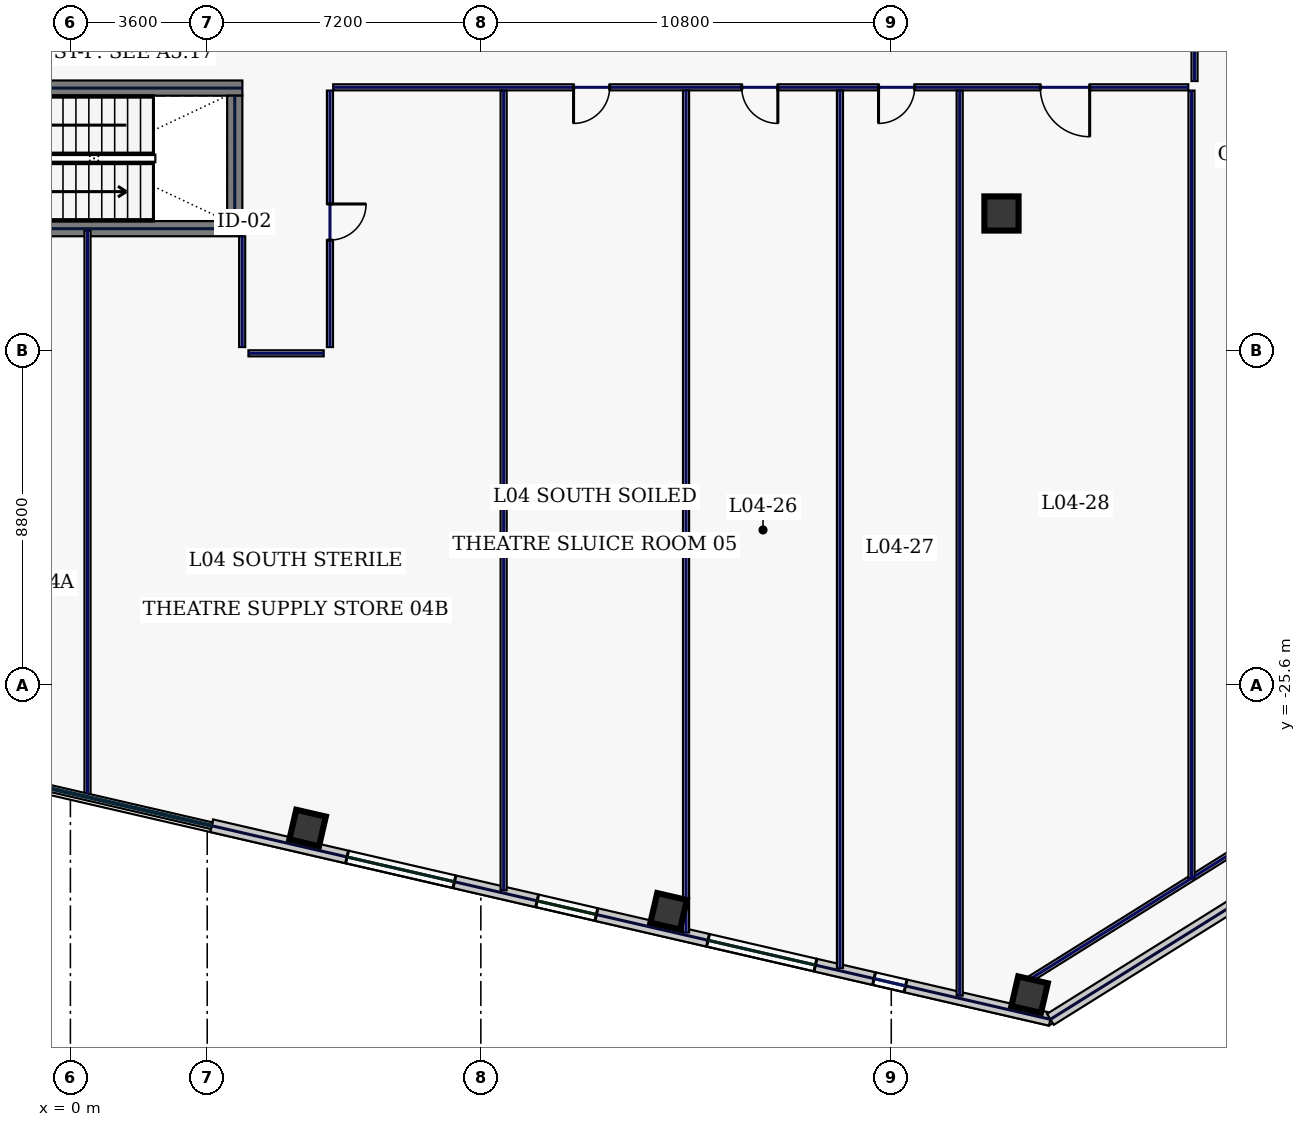
"""IFC4 building model, lengths in metres.
Left out: names, types, materials, properties, quantities, classifications, styles, units other than length and angle.
Written with IfcOpenShell. Run it as: python <this file> out.ifc"""

import sys

from ifc_helpers import new_model, si_unit, direction, frame, frame_2d, origin, origin_2d, place, context, subcontext, project, spatial, rectangle, hollow_rectangle, extrude, element, fill, save


model = new_model("IFC4")
c1 = context("Model", 3, precision=1e-05, world=origin(), true_north=direction((0.0, 1.0)))
c2 = subcontext(c1, "Body", "Model", "MODEL_VIEW")
j1 = project(units=[si_unit("LENGTHUNIT", "METRE"), si_unit("PLANEANGLEUNIT", "RADIAN")], contexts=[c1])
p1 = place(None, origin())
s1 = spatial("IfcSite", under=j1, at=p1, CompositionType="ELEMENT")
p2 = place(p1, origin())
s2 = spatial("IfcBuilding", under=s1, at=p2, CompositionType="ELEMENT")
p3 = place(p2, frame((0.0, 0.0, 23.4)))
s3 = spatial("IfcBuildingStorey", under=s2, at=p3, CompositionType="ELEMENT", Elevation=23.4)
p4 = place(p3, frame((-4.525, -13.6, 0.0), z_axis=(0.0, 0.0, 1.0), x_axis=(1.0, 0.0, 0.0)))
e1 = element("IfcWall", 1, at=p4, inside=s3, PredefinedType="SHEAR", context=c2, shape_type="SweptSolid", body=[
    extrude(rectangle(XDim=9.05, YDim=0.4, at=frame_2d((4.525, 0.0))), origin(), (0.0, 0.0, 1.0), 4.7),
])
p5 = place(p3, frame((-4.525, -9.9, 0.0), z_axis=(0.0, 0.0, 1.0), x_axis=(1.0, 0.0, 0.0)))
e2 = element("IfcWall", 2, at=p5, inside=s3, PredefinedType="SHEAR", context=c2, shape_type="SweptSolid", body=[
    extrude(rectangle(XDim=9.05, YDim=0.4, at=frame_2d((4.525, 0.0))), origin(), (0.0, 0.0, 1.0), 4.7),
])
p6 = place(p5, frame((0.25, 0.0, 0.0)))
e3 = element("IfcOpeningElement", 3, at=p6, cuts=e2, PredefinedType="OPENING", context=c2, shape_type="SweptSolid", body=[
    extrude(rectangle(XDim=1.1, YDim=2.2, at=frame_2d((0.55, 1.1))), frame((0.0, 0.21, 0.0), z_axis=(0.0, -1.0, 0.0), x_axis=(1.0, 0.0, 0.0)), (0.0, 0.0, 1.0), 0.42),
])
p7 = place(p3, frame((4.325, -13.4, 0.0), z_axis=(0.0, 0.0, 1.0), x_axis=(0.0, 1.0, 0.0)))
e4 = element("IfcWall", 4, at=p7, inside=s3, PredefinedType="SHEAR", context=c2, shape_type="SweptSolid", body=[
    extrude(rectangle(XDim=3.3, YDim=0.4, at=frame_2d((1.65, 0.0))), origin(), (0.0, 0.0, 1.0), 4.7),
])
p8 = place(p3, frame((24.5, -13.2, 0.0), z_axis=(0.0, 0.0, 1.0), x_axis=(1.0, 0.0, 0.0)))
e5 = element("IfcColumn", 5, at=p8, inside=s3, PredefinedType="COLUMN", context=c2, shape_type="SweptSolid", body=[
    extrude(hollow_rectangle(XDim=0.9, YDim=0.9, WallThickness=0.04, at=origin_2d()), origin(), (0.0, 0.0, 1.0), 4.7),
])
for number, where, z_axis, x_axis in (
    (6, (6.242, -29.371, 0.0), (0.0, 0.0, 1.0), (0.974, -0.225, 0.0)),
    (7, (15.741, -31.564, 0.0), (0.0, 0.0, 1.0), (0.974, -0.225, 0.0)),
    (8, (25.24, -33.757, 0.0), (0.0, 0.0, 1.0), (0.974, -0.225, 0.0)),
):
    element("IfcColumn", number, at=place(p3, frame(where, z_axis=z_axis, x_axis=x_axis)), inside=s3, PredefinedType="COLUMN", context=c2, shape_type="SweptSolid", body=[
        extrude(hollow_rectangle(XDim=0.8, YDim=0.8, WallThickness=0.036, at=origin_2d()), origin(), (0.0, 0.0, 1.0), 4.7),
    ])
p9 = place(p3, frame((3.717, -29.311, 0.0), z_axis=(0.0, 0.0, 1.0), x_axis=(0.97436993772, -0.224951604723, 0.0)))
e9 = element("IfcWall", 9, at=p9, inside=s3, PredefinedType="STANDARD", context=c2, shape_type="SweptSolid", body=[
    extrude(rectangle(XDim=22.651, YDim=0.34, at=frame_2d((11.326, 0.0))), origin(), (0.0, 0.0, 1.0), 4.7),
])
p10 = place(p9, frame((3.656, 0.0, 0.85)))
e10 = element("IfcOpeningElement", 10, at=p10, cuts=e9, PredefinedType="OPENING", context=c2, shape_type="SweptSolid", body=[
    extrude(rectangle(XDim=2.9, YDim=2.3, at=frame_2d((1.45, 1.15))), frame((0.0, 0.18, 0.0), z_axis=(0.0, -1.0, 0.0), x_axis=(1.0, 0.0, 0.0)), (0.0, 0.0, 1.0), 0.36),
])
p11 = place(p9, frame((8.791, 0.0, 0.22)))
e11 = element("IfcOpeningElement", 11, at=p11, cuts=e9, PredefinedType="OPENING", context=c2, shape_type="SweptSolid", body=[
    extrude(rectangle(XDim=1.6, YDim=1.2, at=frame_2d((0.8, 0.6))), frame((0.0, 0.18, 0.0), z_axis=(0.0, -1.0, 0.0), x_axis=(1.0, 0.0, 0.0)), (0.0, 0.0, 1.0), 0.36),
])
p12 = place(p9, frame((13.405, 0.0, 0.85)))
e12 = element("IfcOpeningElement", 12, at=p12, cuts=e9, PredefinedType="OPENING", context=c2, shape_type="SweptSolid", body=[
    extrude(rectangle(XDim=2.9, YDim=2.3, at=frame_2d((1.45, 1.15))), frame((0.0, 0.18, 0.0), z_axis=(0.0, -1.0, 0.0), x_axis=(1.0, 0.0, 0.0)), (0.0, 0.0, 1.0), 0.36),
])
p13 = place(p9, frame((17.889, 0.0, 0.85)))
e13 = element("IfcOpeningElement", 13, at=p13, cuts=e9, PredefinedType="OPENING", context=c2, shape_type="SweptSolid", body=[
    extrude(rectangle(XDim=0.85, YDim=1.85, at=frame_2d((0.425, 0.925))), frame((0.0, 0.18, 0.0), z_axis=(0.0, -1.0, 0.0), x_axis=(1.0, 0.0, 0.0)), (0.0, 0.0, 1.0), 0.36),
])
p14 = place(p3, frame((25.788, -34.406, 0.0), z_axis=(0.0, 0.0, 1.0), x_axis=(0.848046504656, 0.529921811158, 0.0)))
e14 = element("IfcWall", 14, at=p14, inside=s3, PredefinedType="STANDARD", context=c2, shape_type="SweptSolid", body=[
    extrude(rectangle(XDim=7.113, YDim=0.34, at=frame_2d((3.557, 0.0))), origin(), (0.0, 0.0, 1.0), 4.7),
])
p15 = place(p3, frame((25.06, -33.468, 0.0), z_axis=(0.0, 0.0, 1.0), x_axis=(0.848043064089, 0.529927317139, 0.0)))
e15 = element("IfcWall", 15, at=p15, inside=s3, PredefinedType="PARTITIONING", context=c2, shape_type="SweptSolid", body=[
    extrude(rectangle(XDim=7.354, YDim=0.16, at=frame_2d((3.677, 0.0))), origin(), (0.0, 0.0, 1.0), 4.7),
])
p16 = place(p3, frame((29.58, 9.715, 0.0), z_axis=(0.0, 0.0, 1.0), x_axis=(0.0, -1.0, 0.0)))
e16 = element("IfcWall", 16, at=p16, inside=s3, PredefinedType="PARTITIONING", context=c2, shape_type="SweptSolid", body=[
    extrude(rectangle(XDim=19.43, YDim=0.16, at=frame_2d((9.715, 0.0))), origin(), (0.0, 0.0, 1.0), 4.7),
])
p17 = place(p16, frame((16.631, 0.0, 0.0)))
e17 = element("IfcOpeningElement", 17, at=p17, cuts=e16, PredefinedType="OPENING", context=c2, shape_type="SweptSolid", body=[
    extrude(rectangle(XDim=0.95, YDim=2.2, at=frame_2d((0.475, 1.1))), frame((0.0, 0.09, 0.0), z_axis=(0.0, -1.0, 0.0), x_axis=(1.0, 0.0, 0.0)), (0.0, 0.0, 1.0), 0.18),
])
p18 = place(p16, frame((11.925, 0.0, 0.0)))
e18 = element("IfcOpeningElement", 18, at=p18, cuts=e16, PredefinedType="OPENING", context=c2, shape_type="SweptSolid", body=[
    extrude(rectangle(XDim=0.95, YDim=2.2, at=frame_2d((0.475, 1.1))), frame((0.0, 0.09, 0.0), z_axis=(0.0, -1.0, 0.0), x_axis=(1.0, 0.0, 0.0)), (0.0, 0.0, 1.0), 0.18),
])
p19 = place(p16, frame((6.725, 0.0, 0.0)))
e19 = element("IfcOpeningElement", 19, at=p19, cuts=e16, PredefinedType="OPENING", context=c2, shape_type="SweptSolid", body=[
    extrude(rectangle(XDim=0.95, YDim=2.2, at=frame_2d((0.475, 1.1))), frame((0.0, 0.09, 0.0), z_axis=(0.0, -1.0, 0.0), x_axis=(1.0, 0.0, 0.0)), (0.0, 0.0, 1.0), 0.18),
])
p20 = place(p16, frame((2.019, 0.0, 0.0)))
e20 = element("IfcOpeningElement", 20, at=p20, cuts=e16, PredefinedType="OPENING", context=c2, shape_type="SweptSolid", body=[
    extrude(rectangle(XDim=0.95, YDim=2.2, at=frame_2d((0.475, 1.1))), frame((0.0, 0.09, 0.0), z_axis=(0.0, -1.0, 0.0), x_axis=(1.0, 0.0, 0.0)), (0.0, 0.0, 1.0), 0.18),
])
p21 = place(p3, frame((29.415, -9.88, 0.0), z_axis=(0.0, 0.0, 1.0), x_axis=(-1.0, 0.0, 0.0)))
e21 = element("IfcWall", 21, at=p21, inside=s3, PredefinedType="PARTITIONING", context=c2, shape_type="SweptSolid", body=[
    extrude(rectangle(XDim=22.5, YDim=0.16, at=frame_2d((11.25, 0.0))), origin(), (0.0, 0.0, 1.0), 4.7),
])
p22 = place(p21, frame((15.225, 0.0, 0.0)))
e22 = element("IfcOpeningElement", 22, at=p22, cuts=e21, PredefinedType="OPENING", context=c2, shape_type="SweptSolid", body=[
    extrude(rectangle(XDim=0.95, YDim=2.2, at=frame_2d((0.475, 1.1))), frame((0.0, 0.09, 0.0), z_axis=(0.0, -1.0, 0.0), x_axis=(1.0, 0.0, 0.0)), (0.0, 0.0, 1.0), 0.18),
])
p23 = place(p21, frame((10.8, 0.0, 0.0)))
e23 = element("IfcOpeningElement", 23, at=p23, cuts=e21, PredefinedType="OPENING", context=c2, shape_type="SweptSolid", body=[
    extrude(rectangle(XDim=0.95, YDim=2.2, at=frame_2d((0.475, 1.1))), frame((0.0, 0.09, 0.0), z_axis=(0.0, -1.0, 0.0), x_axis=(1.0, 0.0, 0.0)), (0.0, 0.0, 1.0), 0.18),
])
p24 = place(p21, frame((7.2, 0.0, 0.0)))
e24 = element("IfcOpeningElement", 24, at=p24, cuts=e21, PredefinedType="OPENING", context=c2, shape_type="SweptSolid", body=[
    extrude(rectangle(XDim=0.95, YDim=2.2, at=frame_2d((0.475, 1.1))), frame((0.0, 0.09, 0.0), z_axis=(0.0, -1.0, 0.0), x_axis=(1.0, 0.0, 0.0)), (0.0, 0.0, 1.0), 0.18),
])
p25 = place(p21, frame((2.594, 0.0, 0.0)))
e25 = element("IfcOpeningElement", 25, at=p25, cuts=e21, PredefinedType="OPENING", context=c2, shape_type="SweptSolid", body=[
    extrude(rectangle(XDim=1.3, YDim=2.2, at=frame_2d((0.65, 1.1))), frame((0.0, 0.09, 0.0), z_axis=(0.0, -1.0, 0.0), x_axis=(1.0, 0.0, 0.0)), (0.0, 0.0, 1.0), 0.18),
])
p26 = place(p3, frame((6.83, -9.965, 0.0), z_axis=(0.0, 0.0, 1.0), x_axis=(0.0, -1.0, 0.0)))
e26 = element("IfcWall", 26, at=p26, inside=s3, PredefinedType="PARTITIONING", context=c2, shape_type="SweptSolid", body=[
    extrude(rectangle(XDim=6.75, YDim=0.16, at=frame_2d((3.375, 0.0))), origin(), (0.0, 0.0, 1.0), 4.7),
])
p27 = place(p26, frame((2.985, 0.0, 0.0)))
e27 = element("IfcOpeningElement", 27, at=p27, cuts=e26, PredefinedType="OPENING", context=c2, shape_type="SweptSolid", body=[
    extrude(rectangle(XDim=0.95, YDim=2.2, at=frame_2d((0.475, 1.1))), frame((0.0, 0.09, 0.0), z_axis=(0.0, -1.0, 0.0), x_axis=(1.0, 0.0, 0.0)), (0.0, 0.0, 1.0), 0.18),
])
p28 = place(p3, frame((6.665, -16.88, 0.0), z_axis=(0.0, 0.0, 1.0), x_axis=(-1.0, 0.0, 0.0)))
e28 = element("IfcWall", 28, at=p28, inside=s3, PredefinedType="PARTITIONING", context=c2, shape_type="SweptSolid", body=[
    extrude(rectangle(XDim=1.98, YDim=0.16, at=frame_2d((0.99, 0.0))), origin(), (0.0, 0.0, 1.0), 4.7),
])
p29 = place(p3, frame((4.52, -16.715, 0.0), z_axis=(0.0, 0.0, 1.0), x_axis=(0.0, 1.0, 0.0)))
e29 = element("IfcWall", 29, at=p29, inside=s3, PredefinedType="PARTITIONING", context=c2, shape_type="SweptSolid", body=[
    extrude(rectangle(XDim=2.915, YDim=0.16, at=frame_2d((1.458, 0.0))), origin(), (0.0, 0.0, 1.0), 4.7),
])
p30 = place(p3, frame((29.5, -30.703, 0.0), z_axis=(0.0, 0.0, 1.0), x_axis=(0.0, 1.0, 0.0)))
e30 = element("IfcWall", 30, at=p30, inside=s3, PredefinedType="PARTITIONING", context=c2, shape_type="SweptSolid", body=[
    extrude(rectangle(XDim=20.738, YDim=0.16, at=frame_2d((10.369, 0.0))), origin(), (0.0, 0.0, 1.0), 4.7),
])
p31 = place(p3, frame((11.4, -31.013, 0.0), z_axis=(0.0, 0.0, 1.0), x_axis=(0.0, 1.0, 0.0)))
e31 = element("IfcWall", 31, at=p31, inside=s3, PredefinedType="PARTITIONING", context=c2, shape_type="SweptSolid", body=[
    extrude(rectangle(XDim=21.048, YDim=0.16, at=frame_2d((10.524, 0.0))), origin(), (0.0, 0.0, 1.0), 4.7),
])
p32 = place(p3, frame((16.2, -32.121, 0.0), z_axis=(0.0, 0.0, 1.0), x_axis=(0.0, 1.0, 0.0)))
e32 = element("IfcWall", 32, at=p32, inside=s3, PredefinedType="PARTITIONING", context=c2, shape_type="SweptSolid", body=[
    extrude(rectangle(XDim=22.156, YDim=0.16, at=frame_2d((11.078, 0.0))), origin(), (0.0, 0.0, 1.0), 4.7),
])
p33 = place(p3, frame((23.4, -33.783, 0.0), z_axis=(0.0, 0.0, 1.0), x_axis=(0.0, 1.0, 0.0)))
e33 = element("IfcWall", 33, at=p33, inside=s3, PredefinedType="PARTITIONING", context=c2, shape_type="SweptSolid", body=[
    extrude(rectangle(XDim=23.818, YDim=0.16, at=frame_2d((11.909, 0.0))), origin(), (0.0, 0.0, 1.0), 4.7),
])
p34 = place(p3, frame((0.45, -28.485, 0.0), z_axis=(0.0, 0.0, 1.0), x_axis=(0.0, 1.0, 0.0)))
e34 = element("IfcWall", 34, at=p34, inside=s3, PredefinedType="PARTITIONING", context=c2, shape_type="SweptSolid", body=[
    extrude(rectangle(XDim=14.845, YDim=0.16, at=frame_2d((7.423, 0.0))), origin(), (0.0, 0.0, 1.0), 4.7),
])
p35 = place(p3, frame((20.25, -33.056, 0.0), z_axis=(0.0, 0.0, 1.0), x_axis=(0.0, 1.0, 0.0)))
e35 = element("IfcWall", 35, at=p35, inside=s3, PredefinedType="PARTITIONING", context=c2, shape_type="SweptSolid", body=[
    extrude(rectangle(XDim=23.091, YDim=0.16, at=frame_2d((11.545, 0.0))), origin(), (0.0, 0.0, 1.0), 4.7),
])
p36 = place(p10, origin())
e36 = element("IfcWindow", 36, at=p36, inside=s3, PartitioningType="SINGLE_PANEL", PredefinedType="WINDOW", context=c2, shape_type="SweptSolid", body=[
    extrude(rectangle(XDim=2.9, YDim=2.3, at=frame_2d((1.45, 1.15))), frame((0.0, 0.03, 0.0), z_axis=(0.0, -1.0, 0.0), x_axis=(1.0, 0.0, 0.0)), (0.0, 0.0, 1.0), 0.06),
])
fill(e10, e36)
p37 = place(p11, origin())
e37 = element("IfcWindow", 37, at=p37, inside=s3, PartitioningType="SINGLE_PANEL", PredefinedType="WINDOW", context=c2, shape_type="SweptSolid", body=[
    extrude(rectangle(XDim=1.6, YDim=1.2, at=frame_2d((0.8, 0.6))), frame((0.0, 0.03, 0.0), z_axis=(0.0, -1.0, 0.0), x_axis=(1.0, 0.0, 0.0)), (0.0, 0.0, 1.0), 0.06),
])
fill(e11, e37)
p38 = place(p12, origin())
e38 = element("IfcWindow", 38, at=p38, inside=s3, PartitioningType="SINGLE_PANEL", PredefinedType="WINDOW", context=c2, shape_type="SweptSolid", body=[
    extrude(rectangle(XDim=2.9, YDim=2.3, at=frame_2d((1.45, 1.15))), frame((0.0, 0.03, 0.0), z_axis=(0.0, -1.0, 0.0), x_axis=(1.0, 0.0, 0.0)), (0.0, 0.0, 1.0), 0.06),
])
fill(e12, e38)
p39 = place(p13, origin())
e39 = element("IfcWindow", 39, at=p39, inside=s3, PartitioningType="SINGLE_PANEL", PredefinedType="WINDOW", context=c2, shape_type="SweptSolid", body=[
    extrude(rectangle(XDim=0.85, YDim=1.85, at=frame_2d((0.425, 0.925))), frame((0.0, 0.03, 0.0), z_axis=(0.0, -1.0, 0.0), x_axis=(1.0, 0.0, 0.0)), (0.0, 0.0, 1.0), 0.06),
])
fill(e13, e39)
p40 = place(p27, origin())
e40 = element("IfcDoor", 40, at=p40, inside=s3, OperationType="SINGLE_SWING_LEFT", PredefinedType="DOOR", context=c2, shape_type="SweptSolid", body=[
    extrude(rectangle(XDim=0.95, YDim=2.2, at=frame_2d((0.475, 1.1))), frame((0.0, 0.025, 0.0), z_axis=(0.0, -1.0, 0.0), x_axis=(1.0, 0.0, 0.0)), (0.0, 0.0, 1.0), 0.05),
])
fill(e27, e40)
p41 = place(p22, origin())
e41 = element("IfcDoor", 41, at=p41, inside=s3, OperationType="SINGLE_SWING_RIGHT", PredefinedType="DOOR", context=c2, shape_type="SweptSolid", body=[
    extrude(rectangle(XDim=0.95, YDim=2.2, at=frame_2d((0.475, 1.1))), frame((0.0, 0.025, 0.0), z_axis=(0.0, -1.0, 0.0), x_axis=(1.0, 0.0, 0.0)), (0.0, 0.0, 1.0), 0.05),
])
fill(e22, e41)
p42 = place(p23, origin())
e42 = element("IfcDoor", 42, at=p42, inside=s3, OperationType="SINGLE_SWING_LEFT", PredefinedType="DOOR", context=c2, shape_type="SweptSolid", body=[
    extrude(rectangle(XDim=0.95, YDim=2.2, at=frame_2d((0.475, 1.1))), frame((0.0, 0.025, 0.0), z_axis=(0.0, -1.0, 0.0), x_axis=(1.0, 0.0, 0.0)), (0.0, 0.0, 1.0), 0.05),
])
fill(e23, e42)
p43 = place(p24, origin())
e43 = element("IfcDoor", 43, at=p43, inside=s3, OperationType="SINGLE_SWING_RIGHT", PredefinedType="DOOR", context=c2, shape_type="SweptSolid", body=[
    extrude(rectangle(XDim=0.95, YDim=2.2, at=frame_2d((0.475, 1.1))), frame((0.0, 0.025, 0.0), z_axis=(0.0, -1.0, 0.0), x_axis=(1.0, 0.0, 0.0)), (0.0, 0.0, 1.0), 0.05),
])
fill(e24, e43)
p44 = place(p25, origin())
e44 = element("IfcDoor", 44, at=p44, inside=s3, OperationType="SINGLE_SWING_LEFT", PredefinedType="DOOR", context=c2, shape_type="SweptSolid", body=[
    extrude(rectangle(XDim=1.3, YDim=2.2, at=frame_2d((0.65, 1.1))), frame((0.0, 0.025, 0.0), z_axis=(0.0, -1.0, 0.0), x_axis=(1.0, 0.0, 0.0)), (0.0, 0.0, 1.0), 0.05),
])
fill(e25, e44)
save(model, sys.argv[1])
